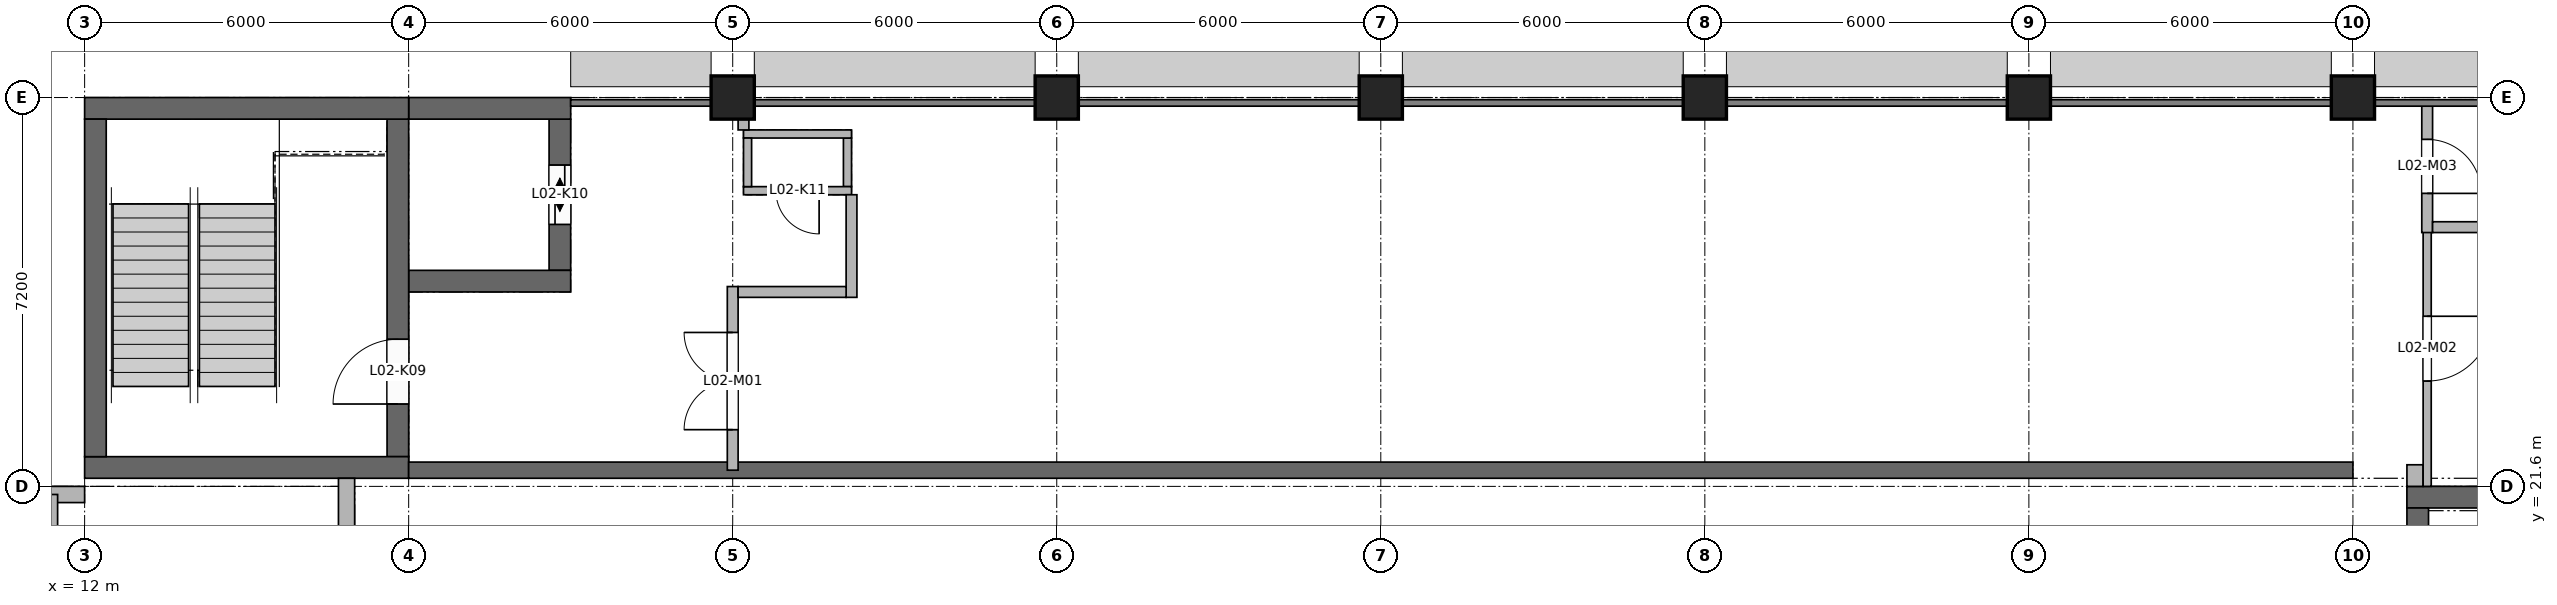
"""IFC4 building model, lengths in metres.
Left out: names, types, materials, properties, quantities, classifications, styles, units other than length and angle.
Written with IfcOpenShell. Run it as: python <this file> out.ifc"""

import sys

from ifc_helpers import new_model, si_unit, direction, frame, frame_2d, origin, origin_2d, place, context, subcontext, project, spatial, rectangle, extrude, element, fill, save


model = new_model("IFC4")
c1 = context("Model", 3, precision=1e-05, world=origin(), true_north=direction((0.0, 1.0)))
c2 = subcontext(c1, "Body", "Model", "MODEL_VIEW")
j1 = project(units=[si_unit("LENGTHUNIT", "METRE"), si_unit("PLANEANGLEUNIT", "RADIAN")], contexts=[c1])
p1 = place(None, origin())
s1 = spatial("IfcSite", under=j1, at=p1, CompositionType="ELEMENT")
p2 = place(p1, origin())
s2 = spatial("IfcBuilding", under=s1, at=p2, CompositionType="ELEMENT")
p3 = place(p2, frame((0.0, 0.0, 8.4)))
s3 = spatial("IfcBuildingStorey", under=s2, at=p3, CompositionType="ELEMENT", Elevation=8.4)
p4 = place(p3, frame((55.0, 21.4, 0.0), z_axis=(0.0, 0.0, 1.0), x_axis=(1.0, 0.0, 0.0)))
e1 = element("IfcWall", 1, at=p4, inside=s3, PredefinedType="SHEAR", context=c2, shape_type="SweptSolid", body=[
    extrude(rectangle(XDim=5.0, YDim=0.4, at=frame_2d((2.5, 0.0))), origin(), (0.0, 0.0, 1.0), 3.95),
])
p5 = place(p3, frame((55.2, 14.8, 0.0), z_axis=(0.0, 0.0, 1.0), x_axis=(0.0, 1.0, 0.0)))
e2 = element("IfcWall", 2, at=p5, inside=s3, PredefinedType="SHEAR", context=c2, shape_type="SweptSolid", body=[
    extrude(rectangle(XDim=6.4, YDim=0.4, at=frame_2d((3.2, 0.0))), origin(), (0.0, 0.0, 1.0), 3.95),
])
for number, where, z_axis, x_axis in (
    (3, (12.0, 21.95, 0.0), (0.0, 0.0, 1.0), (1.0, 0.0, 0.0)),
    (4, (12.0, 28.6, 0.0), (0.0, 0.0, 1.0), (1.0, 0.0, 0.0)),
):
    element("IfcWall", number, at=place(p3, frame(where, z_axis=z_axis, x_axis=x_axis)), inside=s3, PredefinedType="SHEAR", context=c2, shape_type="SweptSolid", body=[
        extrude(rectangle(XDim=6.0, YDim=0.4, at=frame_2d((3.0, 0.0))), origin(), (0.0, 0.0, 1.0), 3.78),
    ])
p6 = place(p3, frame((12.2, 22.15, 0.0), z_axis=(0.0, 0.0, 1.0), x_axis=(0.0, 1.0, 0.0)))
e5 = element("IfcWall", 5, at=p6, inside=s3, PredefinedType="SHEAR", context=c2, shape_type="SweptSolid", body=[
    extrude(rectangle(XDim=6.25, YDim=0.4, at=frame_2d((3.125, 0.0))), origin(), (0.0, 0.0, 1.0), 3.78),
])
p7 = place(p3, frame((17.8, 22.15, 0.0), z_axis=(0.0, 0.0, 1.0), x_axis=(0.0, 1.0, 0.0)))
e6 = element("IfcWall", 6, at=p7, inside=s3, PredefinedType="SHEAR", context=c2, shape_type="SweptSolid", body=[
    extrude(rectangle(XDim=6.25, YDim=0.4, at=frame_2d((3.125, 0.0))), origin(), (0.0, 0.0, 1.0), 3.78),
])
p8 = place(p7, frame((0.975, 0.0, 0.0)))
e7 = element("IfcOpeningElement", 7, at=p8, cuts=e6, PredefinedType="OPENING", context=c2, shape_type="SweptSolid", body=[
    extrude(rectangle(XDim=1.2, YDim=2.1, at=frame_2d((0.6, 1.05))), frame((0.0, 0.21, 0.0), z_axis=(0.0, -1.0, 0.0), x_axis=(1.0, 0.0, 0.0)), (0.0, 0.0, 1.0), 0.42),
])
for number, where, z_axis, x_axis in (
    (8, (18.0, 25.4, 0.0), (0.0, 0.0, 1.0), (1.0, 0.0, 0.0)),
    (9, (18.0, 28.6, 0.0), (0.0, 0.0, 1.0), (1.0, 0.0, 0.0)),
):
    element("IfcWall", number, at=place(p3, frame(where, z_axis=z_axis, x_axis=x_axis)), inside=s3, PredefinedType="SHEAR", context=c2, shape_type="SweptSolid", body=[
        extrude(rectangle(XDim=3.0, YDim=0.4, at=frame_2d((1.5, 0.0))), origin(), (0.0, 0.0, 1.0), 4.2),
    ])
p9 = place(p3, frame((20.8, 25.6, 0.0), z_axis=(0.0, 0.0, 1.0), x_axis=(0.0, 1.0, 0.0)))
e10 = element("IfcWall", 10, at=p9, inside=s3, PredefinedType="SHEAR", context=c2, shape_type="SweptSolid", body=[
    extrude(rectangle(XDim=2.8, YDim=0.4, at=frame_2d((1.4, 0.0))), origin(), (0.0, 0.0, 1.0), 4.2),
])
p10 = place(p9, frame((0.85, 0.0, 0.0)))
e11 = element("IfcOpeningElement", 11, at=p10, cuts=e10, PredefinedType="OPENING", context=c2, shape_type="SweptSolid", body=[
    extrude(rectangle(XDim=1.1, YDim=2.1, at=frame_2d((0.55, 1.05))), frame((0.0, 0.21, 0.0), z_axis=(0.0, -1.0, 0.0), x_axis=(1.0, 0.0, 0.0)), (0.0, 0.0, 1.0), 0.42),
])
p11 = place(p3, frame((24.2, 27.075, 0.0), z_axis=(0.0, 0.0, 1.0), x_axis=(1.0, 0.0, 0.0)))
e12 = element("IfcWall", 12, at=p11, inside=s3, PredefinedType="SOLIDWALL", context=c2, shape_type="SweptSolid", body=[
    extrude(rectangle(XDim=2.0, YDim=0.15, at=frame_2d((1.0, 0.0))), origin(), (0.0, 0.0, 1.0), 4.2),
])
p12 = place(p11, frame((0.6, 0.0, 0.0)))
e13 = element("IfcOpeningElement", 13, at=p12, cuts=e12, PredefinedType="OPENING", context=c2, shape_type="SweptSolid", body=[
    extrude(rectangle(XDim=0.8, YDim=2.1, at=frame_2d((0.4, 1.05))), frame((0.0, 0.085, 0.0), z_axis=(0.0, -1.0, 0.0), x_axis=(1.0, 0.0, 0.0)), (0.0, 0.0, 1.0), 0.17),
])
p13 = place(p3, frame((24.2, 28.125, 0.0), z_axis=(0.0, 0.0, 1.0), x_axis=(1.0, 0.0, 0.0)))
e14 = element("IfcWall", 14, at=p13, inside=s3, PredefinedType="SOLIDWALL", context=c2, shape_type="SweptSolid", body=[
    extrude(rectangle(XDim=2.0, YDim=0.15, at=frame_2d((1.0, 0.0))), origin(), (0.0, 0.0, 1.0), 4.2),
])
for number, where, z_axis, x_axis in (
    (15, (24.275, 27.15, 0.0), (0.0, 0.0, 1.0), (0.0, 1.0, 0.0)),
    (16, (26.125, 27.15, 0.0), (0.0, 0.0, 1.0), (0.0, 1.0, 0.0)),
):
    element("IfcWall", number, at=place(p3, frame(where, z_axis=z_axis, x_axis=x_axis)), inside=s3, PredefinedType="SOLIDWALL", context=c2, shape_type="SweptSolid", body=[
        extrude(rectangle(XDim=0.9, YDim=0.15, at=frame_2d((0.45, 0.0))), origin(), (0.0, 0.0, 1.0), 4.2),
    ])
for number, where, z_axis, x_axis in (
    (17, (24.0, 28.8, 0.0), (0.0, 0.0, 1.0), (1.0, 0.0, 0.0)),
    (18, (30.0, 28.8, 0.0), (0.0, 0.0, 1.0), (1.0, 0.0, 0.0)),
    (19, (36.0, 28.8, 0.0), (0.0, 0.0, 1.0), (1.0, 0.0, 0.0)),
    (20, (42.0, 28.8, 0.0), (0.0, 0.0, 1.0), (1.0, 0.0, 0.0)),
    (21, (48.0, 28.8, 0.0), (0.0, 0.0, 1.0), (1.0, 0.0, 0.0)),
    (22, (54.0, 28.8, 0.0), (0.0, 0.0, 1.0), (1.0, 0.0, 0.0)),
):
    element("IfcColumn", number, at=place(p3, frame(where, z_axis=z_axis, x_axis=x_axis)), inside=s3, PredefinedType="COLUMN", context=c2, shape_type="SweptSolid", body=[
        extrude(rectangle(XDim=0.8, YDim=0.8, at=origin_2d()), origin(), (0.0, 0.0, 1.0), 4.0),
    ])
p14 = place(p3, frame((16.85, 14.7, 0.0), z_axis=(0.0, 0.0, 1.0), x_axis=(0.0, 1.0, 0.0)))
e23 = element("IfcWall", 23, at=p14, inside=s3, PredefinedType="SOLIDWALL", context=c2, shape_type="SweptSolid", body=[
    extrude(rectangle(XDim=7.05, YDim=0.3, at=frame_2d((3.525, 0.0))), origin(), (0.0, 0.0, 1.0), 3.05),
])
p15 = place(p3, frame((6.0, 21.45, 0.0), z_axis=(0.0, 0.0, 1.0), x_axis=(1.0, 0.0, 0.0)))
e24 = element("IfcWall", 24, at=p15, inside=s3, PredefinedType="SOLIDWALL", context=c2, shape_type="SweptSolid", body=[
    extrude(rectangle(XDim=6.0, YDim=0.3, at=frame_2d((3.0, 0.0))), origin(), (0.0, 0.0, 1.0), 3.95),
])
p16 = place(p15, frame((1.05, 0.0, 0.0)))
e25 = element("IfcOpeningElement", 25, at=p16, cuts=e24, PredefinedType="OPENING", context=c2, shape_type="SweptSolid", body=[
    extrude(rectangle(XDim=1.5, YDim=2.4, at=frame_2d((0.75, 1.2))), frame((0.0, 0.16, 0.0), z_axis=(0.0, -1.0, 0.0), x_axis=(1.0, 0.0, 0.0)), (0.0, 0.0, 1.0), 0.32),
])
p17 = place(p15, frame((2.762, 0.0, 0.9)))
e26 = element("IfcOpeningElement", 26, at=p17, cuts=e24, PredefinedType="OPENING", context=c2, shape_type="SweptSolid", body=[
    extrude(rectangle(XDim=1.1, YDim=1.5, at=frame_2d((0.55, 0.75))), frame((0.0, 0.16, 0.0), z_axis=(0.0, -1.0, 0.0), x_axis=(1.0, 0.0, 0.0)), (0.0, 0.0, 1.0), 0.32),
])
p18 = place(p15, frame((4.087, 0.0, 0.9)))
e27 = element("IfcOpeningElement", 27, at=p18, cuts=e24, PredefinedType="OPENING", context=c2, shape_type="SweptSolid", body=[
    extrude(rectangle(XDim=1.1, YDim=1.5, at=frame_2d((0.55, 0.75))), frame((0.0, 0.16, 0.0), z_axis=(0.0, -1.0, 0.0), x_axis=(1.0, 0.0, 0.0)), (0.0, 0.0, 1.0), 0.32),
])
p19 = place(p3, frame((55.15, 21.6, 0.0), z_axis=(0.0, 0.0, 1.0), x_axis=(0.0, 1.0, 0.0)))
e28 = element("IfcWall", 28, at=p19, inside=s3, PredefinedType="SOLIDWALL", context=c2, shape_type="SweptSolid", body=[
    extrude(rectangle(XDim=0.4, YDim=0.3, at=frame_2d((0.2, 0.0))), origin(), (0.0, 0.0, 1.0), 3.95),
])
p20 = place(p3, frame((18.0, 21.9, 0.0), z_axis=(0.0, 0.0, 1.0), x_axis=(1.0, 0.0, 0.0)))
e29 = element("IfcWall", 29, at=p20, inside=s3, PredefinedType="SOLIDWALL", context=c2, shape_type="SweptSolid", body=[
    extrude(rectangle(XDim=36.0, YDim=0.3, at=frame_2d((18.0, 0.0))), origin(), (0.0, 0.0, 1.0), 4.0),
])
p21 = place(p3, frame((11.4, 15.8, 0.0), z_axis=(0.0, 0.0, 1.0), x_axis=(0.0, 1.0, 0.0)))
e30 = element("IfcWall", 30, at=p21, inside=s3, PredefinedType="PARTITIONING", context=c2, shape_type="SweptSolid", body=[
    extrude(rectangle(XDim=5.65, YDim=0.2, at=frame_2d((2.825, 0.0))), origin(), (0.0, 0.0, 1.0), 3.95),
])
p22 = place(p3, frame((24.0, 21.9, 0.0), z_axis=(0.0, 0.0, 1.0), x_axis=(0.0, 1.0, 0.0)))
e31 = element("IfcWall", 31, at=p22, inside=s3, PredefinedType="PARTITIONING", context=c2, shape_type="SweptSolid", body=[
    extrude(rectangle(XDim=3.4, YDim=0.2, at=frame_2d((1.7, 0.0))), origin(), (0.0, 0.0, 1.0), 3.1),
])
p23 = place(p22, frame((0.75, 0.0, 0.0)))
e32 = element("IfcOpeningElement", 32, at=p23, cuts=e31, PredefinedType="OPENING", context=c2, shape_type="SweptSolid", body=[
    extrude(rectangle(XDim=1.8, YDim=2.4, at=frame_2d((0.9, 1.2))), frame((0.0, 0.11, 0.0), z_axis=(0.0, -1.0, 0.0), x_axis=(1.0, 0.0, 0.0)), (0.0, 0.0, 1.0), 0.22),
])
p24 = place(p3, frame((24.2, 28.2, 0.0), z_axis=(0.0, 0.0, 1.0), x_axis=(0.0, 1.0, 0.0)))
e33 = element("IfcWall", 33, at=p24, inside=s3, PredefinedType="PARTITIONING", context=c2, shape_type="SweptSolid", body=[
    extrude(rectangle(XDim=0.2, YDim=0.2, at=frame_2d((0.1, 0.0))), origin(), (0.0, 0.0, 1.0), 3.1),
])
p25 = place(p3, frame((26.2, 25.1, 0.0), z_axis=(0.0, 0.0, 1.0), x_axis=(0.0, 1.0, 0.0)))
e34 = element("IfcWall", 34, at=p25, inside=s3, PredefinedType="PARTITIONING", context=c2, shape_type="SweptSolid", body=[
    extrude(rectangle(XDim=1.9, YDim=0.2, at=frame_2d((0.95, 0.0))), origin(), (0.0, 0.0, 1.0), 4.0),
])
p26 = place(p3, frame((55.375, 21.6, 0.0), z_axis=(0.0, 0.0, 1.0), x_axis=(0.0, 1.0, 0.0)))
e35 = element("IfcWall", 35, at=p26, inside=s3, PredefinedType="PARTITIONING", context=c2, shape_type="SweptSolid", body=[
    extrude(rectangle(XDim=4.9, YDim=0.15, at=frame_2d((2.45, 0.0))), origin(), (0.0, 0.0, 1.0), 4.0),
])
p27 = place(p26, frame((1.95, 0.0, 0.0)))
e36 = element("IfcOpeningElement", 36, at=p27, cuts=e35, PredefinedType="OPENING", context=c2, shape_type="SweptSolid", body=[
    extrude(rectangle(XDim=1.2, YDim=2.1, at=frame_2d((0.6, 1.05))), frame((0.0, 0.085, 0.0), z_axis=(0.0, -1.0, 0.0), x_axis=(1.0, 0.0, 0.0)), (0.0, 0.0, 1.0), 0.17),
])
p28 = place(p3, frame((55.375, 26.3, 0.0), z_axis=(0.0, 0.0, 1.0), x_axis=(0.0, 1.0, 0.0)))
e37 = element("IfcWall", 37, at=p28, inside=s3, PredefinedType="PARTITIONING", context=c2, shape_type="SweptSolid", body=[
    extrude(rectangle(XDim=2.35, YDim=0.2, at=frame_2d((1.175, 0.0))), origin(), (0.0, 0.0, 1.0), 3.2),
])
p29 = place(p28, frame((0.725, 0.0, 0.0)))
e38 = element("IfcOpeningElement", 38, at=p29, cuts=e37, PredefinedType="OPENING", context=c2, shape_type="SweptSolid", body=[
    extrude(rectangle(XDim=1.0, YDim=2.1, at=frame_2d((0.5, 1.05))), frame((0.0, 0.11, 0.0), z_axis=(0.0, -1.0, 0.0), x_axis=(1.0, 0.0, 0.0)), (0.0, 0.0, 1.0), 0.22),
])
p30 = place(p3, frame((24.1, 25.2, 0.0), z_axis=(0.0, 0.0, 1.0), x_axis=(1.0, 0.0, 0.0)))
e39 = element("IfcWall", 39, at=p30, inside=s3, PredefinedType="PARTITIONING", context=c2, shape_type="SweptSolid", body=[
    extrude(rectangle(XDim=2.0, YDim=0.2, at=frame_2d((1.0, 0.0))), origin(), (0.0, 0.0, 1.0), 3.1),
])
p31 = place(p3, frame((55.475, 26.4, 0.0), z_axis=(0.0, 0.0, 1.0), x_axis=(1.0, 0.0, 0.0)))
e40 = element("IfcWall", 40, at=p31, inside=s3, PredefinedType="PARTITIONING", context=c2, shape_type="SweptSolid", body=[
    extrude(rectangle(XDim=16.375, YDim=0.2, at=frame_2d((8.188, 0.0))), origin(), (0.0, 0.0, 1.0), 3.25),
])
p32 = place(p8, origin())
e41 = element("IfcDoor", 41, at=p32, inside=s3, OperationType="SINGLE_SWING_LEFT", PredefinedType="DOOR", context=c2, shape_type="SweptSolid", body=[
    extrude(rectangle(XDim=1.2, YDim=2.1, at=frame_2d((0.6, 1.05))), frame((0.0, 0.025, 0.0), z_axis=(0.0, -1.0, 0.0), x_axis=(1.0, 0.0, 0.0)), (0.0, 0.0, 1.0), 0.05),
])
fill(e7, e41)
p33 = place(p10, origin())
e42 = element("IfcDoor", 42, at=p33, inside=s3, OperationType="DOUBLE_DOOR_SLIDING", PredefinedType="DOOR", context=c2, shape_type="SweptSolid", body=[
    extrude(rectangle(XDim=1.1, YDim=2.1, at=frame_2d((0.55, 1.05))), frame((0.0, 0.025, 0.0), z_axis=(0.0, -1.0, 0.0), x_axis=(1.0, 0.0, 0.0)), (0.0, 0.0, 1.0), 0.05),
])
fill(e11, e42)
p34 = place(p12, frame((0.8, 0.0, 0.0), z_axis=(0.0, 0.0, 1.0), x_axis=(-1.0, 0.0, 0.0)))
e43 = element("IfcDoor", 43, at=p34, inside=s3, OperationType="SINGLE_SWING_LEFT", PredefinedType="DOOR", context=c2, shape_type="SweptSolid", body=[
    extrude(rectangle(XDim=0.8, YDim=2.1, at=frame_2d((0.4, 1.05))), frame((0.0, 0.025, 0.0), z_axis=(0.0, -1.0, 0.0), x_axis=(1.0, 0.0, 0.0)), (0.0, 0.0, 1.0), 0.05),
])
fill(e13, e43)
p35 = place(p23, origin())
e44 = element("IfcDoor", 44, at=p35, inside=s3, OperationType="DOUBLE_DOOR_SINGLE_SWING", PredefinedType="DOOR", context=c2, shape_type="SweptSolid", body=[
    extrude(rectangle(XDim=1.8, YDim=2.4, at=frame_2d((0.9, 1.2))), frame((0.0, 0.025, 0.0), z_axis=(0.0, -1.0, 0.0), x_axis=(1.0, 0.0, 0.0)), (0.0, 0.0, 1.0), 0.05),
])
fill(e32, e44)
p36 = place(p27, frame((1.2, 0.0, 0.0), z_axis=(0.0, 0.0, 1.0), x_axis=(-1.0, 0.0, 0.0)))
e45 = element("IfcDoor", 45, at=p36, inside=s3, OperationType="SINGLE_SWING_LEFT", PredefinedType="DOOR", context=c2, shape_type="SweptSolid", body=[
    extrude(rectangle(XDim=1.2, YDim=2.1, at=frame_2d((0.6, 1.05))), frame((0.0, 0.025, 0.0), z_axis=(0.0, -1.0, 0.0), x_axis=(1.0, 0.0, 0.0)), (0.0, 0.0, 1.0), 0.05),
])
fill(e36, e45)
p37 = place(p29, frame((1.0, 0.0, 0.0), z_axis=(0.0, 0.0, 1.0), x_axis=(-1.0, 0.0, 0.0)))
e46 = element("IfcDoor", 46, at=p37, inside=s3, OperationType="SINGLE_SWING_RIGHT", PredefinedType="DOOR", context=c2, shape_type="SweptSolid", body=[
    extrude(rectangle(XDim=1.0, YDim=2.1, at=frame_2d((0.5, 1.05))), frame((0.0, 0.025, 0.0), z_axis=(0.0, -1.0, 0.0), x_axis=(1.0, 0.0, 0.0)), (0.0, 0.0, 1.0), 0.05),
])
fill(e38, e46)
save(model, sys.argv[1])
